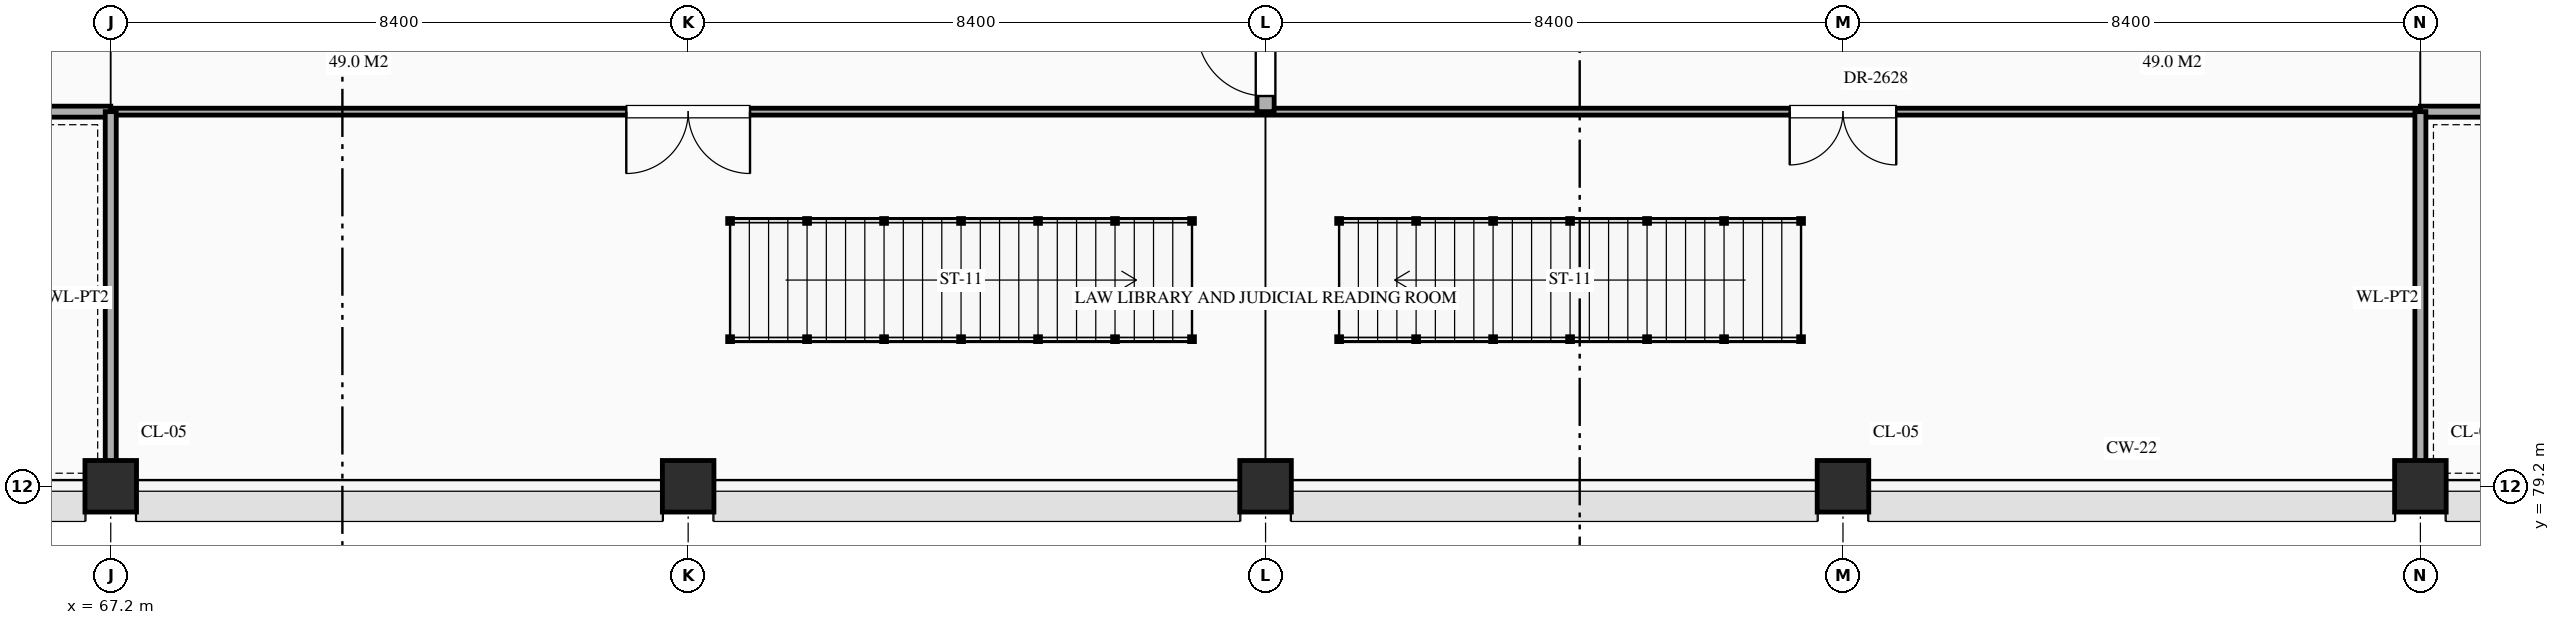
"""IFC4 building model, lengths in metres.
Left out: names, types, materials, properties, quantities, classifications, styles, units other than length and angle.
Written with IfcOpenShell. Run it as: python <this file> out.ifc"""

import sys

from ifc_helpers import new_model, si_unit, direction, frame, frame_2d, origin, origin_2d, place, context, subcontext, project, spatial, rectangle, extrude, element, fill, save


model = new_model("IFC4")
c1 = context("Model", 3, precision=1e-05, world=origin(), true_north=direction((0.0, 1.0)))
c2 = subcontext(c1, "Body", "Model", "MODEL_VIEW")
j1 = project(units=[si_unit("LENGTHUNIT", "METRE"), si_unit("PLANEANGLEUNIT", "RADIAN")], contexts=[c1])
p1 = place(None, origin())
s1 = spatial("IfcSite", under=j1, at=p1, CompositionType="ELEMENT")
p2 = place(p1, origin())
s2 = spatial("IfcBuilding", under=s1, at=p2, CompositionType="ELEMENT")
p3 = place(p2, frame((0.0, 0.0, 35.1)))
s3 = spatial("IfcBuildingStorey", under=s2, at=p3, CompositionType="ELEMENT", Elevation=35.1)
for number, where, z_axis, x_axis in (
    (1, (67.2, 79.2, 0.0), (0.0, 0.0, 1.0), (1.0, 0.0, 0.0)),
    (2, (75.6, 79.2, 0.0), (0.0, 0.0, 1.0), (1.0, 0.0, 0.0)),
    (3, (84.0, 79.2, 0.0), (0.0, 0.0, 1.0), (1.0, 0.0, 0.0)),
    (4, (92.4, 79.2, 0.0), (0.0, 0.0, 1.0), (1.0, 0.0, 0.0)),
    (5, (100.8, 79.2, 0.0), (0.0, 0.0, 1.0), (1.0, 0.0, 0.0)),
):
    element("IfcColumn", number, at=place(p3, frame(where, z_axis=z_axis, x_axis=x_axis)), inside=s3, PredefinedType="COLUMN", context=c2, shape_type="SweptSolid", body=[
        extrude(rectangle(XDim=0.75, YDim=0.75, at=origin_2d()), origin(), (0.0, 0.0, 1.0), 4.2),
    ])
p4 = place(p3, frame((50.4, 84.65, 0.0), z_axis=(0.0, 0.0, 1.0), x_axis=(1.0, 0.0, 0.0)))
e6 = element("IfcWall", 6, at=p4, inside=s3, PredefinedType="STANDARD", context=c2, shape_type="SweptSolid", body=[
    extrude(rectangle(XDim=16.8, YDim=0.16, at=frame_2d((8.4, 0.0))), origin(), (0.0, 0.0, 1.0), 3.95),
])
p5 = place(p4, frame((7.45, 0.0, 0.0)))
e7 = element("IfcOpeningElement", 7, at=p5, cuts=e6, PredefinedType="OPENING", context=c2, shape_type="SweptSolid", body=[
    extrude(rectangle(XDim=1.9, YDim=2.5, at=frame_2d((0.95, 1.25))), frame((0.0, 0.092, 0.0), z_axis=(0.0, -1.0, 0.0), x_axis=(1.0, 0.0, 0.0)), (0.0, 0.0, 1.0), 0.184),
])
p6 = place(p3, frame((67.2, 84.65, 0.0), z_axis=(0.0, 0.0, 1.0), x_axis=(1.0, 0.0, 0.0)))
e8 = element("IfcWall", 8, at=p6, inside=s3, PredefinedType="STANDARD", context=c2, shape_type="SweptSolid", body=[
    extrude(rectangle(XDim=33.6, YDim=0.1, at=frame_2d((16.8, 0.0))), origin(), (0.0, 0.0, 1.0), 3.95),
])
p7 = place(p6, frame((7.5, 0.0, 0.0)))
e9 = element("IfcOpeningElement", 9, at=p7, cuts=e8, PredefinedType="OPENING", context=c2, shape_type="SweptSolid", body=[
    extrude(rectangle(XDim=1.8, YDim=2.5, at=frame_2d((0.9, 1.25))), frame((0.0, 0.062, 0.0), z_axis=(0.0, -1.0, 0.0), x_axis=(1.0, 0.0, 0.0)), (0.0, 0.0, 1.0), 0.124),
])
p8 = place(p6, frame((24.425, 0.0, 0.0)))
e10 = element("IfcOpeningElement", 10, at=p8, cuts=e8, PredefinedType="OPENING", context=c2, shape_type="SweptSolid", body=[
    extrude(rectangle(XDim=1.55, YDim=2.35, at=frame_2d((0.775, 1.175))), frame((0.0, 0.062, 0.0), z_axis=(0.0, -1.0, 0.0), x_axis=(1.0, 0.0, 0.0)), (0.0, 0.0, 1.0), 0.124),
])
p9 = place(p3, frame((100.8, 84.65, 0.0), z_axis=(0.0, 0.0, 1.0), x_axis=(1.0, 0.0, 0.0)))
e11 = element("IfcWall", 11, at=p9, inside=s3, PredefinedType="STANDARD", context=c2, shape_type="SweptSolid", body=[
    extrude(rectangle(XDim=16.8, YDim=0.16, at=frame_2d((8.4, 0.0))), origin(), (0.0, 0.0, 1.0), 3.95),
])
p10 = place(p9, frame((7.55, 0.0, 0.0)))
e12 = element("IfcOpeningElement", 12, at=p10, cuts=e11, PredefinedType="OPENING", context=c2, shape_type="SweptSolid", body=[
    extrude(rectangle(XDim=1.7, YDim=2.45, at=frame_2d((0.85, 1.225))), frame((0.0, 0.092, 0.0), z_axis=(0.0, -1.0, 0.0), x_axis=(1.0, 0.0, 0.0)), (0.0, 0.0, 1.0), 0.184),
])
p11 = place(p3, frame((67.2, 79.24, 0.0), z_axis=(0.0, 0.0, 1.0), x_axis=(0.0, 1.0, 0.0)))
e13 = element("IfcWall", 13, at=p11, inside=s3, PredefinedType="STANDARD", context=c2, shape_type="SweptSolid", body=[
    extrude(rectangle(XDim=5.41, YDim=0.16, at=frame_2d((2.705, 0.0))), origin(), (0.0, 0.0, 1.0), 3.2),
])
p12 = place(p3, frame((84.0, 84.65, 0.0), z_axis=(0.0, 0.0, 1.0), x_axis=(0.0, 1.0, 0.0)))
e14 = element("IfcWall", 14, at=p12, inside=s3, PredefinedType="STANDARD", context=c2, shape_type="SweptSolid", body=[
    extrude(rectangle(XDim=30.51, YDim=0.25, at=frame_2d((15.255, 0.0))), origin(), (0.0, 0.0, 1.0), 3.2),
])
p13 = place(p12, frame((17.097, 0.0, 0.0)))
e15 = element("IfcOpeningElement", 15, at=p13, cuts=e14, PredefinedType="OPENING", context=c2, shape_type="SweptSolid", body=[
    extrude(rectangle(XDim=2.0, YDim=2.4, at=frame_2d((1.0, 1.2))), frame((0.0, 0.137, 0.0), z_axis=(0.0, -1.0, 0.0), x_axis=(1.0, 0.0, 0.0)), (0.0, 0.0, 1.0), 0.274),
])
p14 = place(p12, frame((7.127, 0.0, 0.0)))
e16 = element("IfcOpeningElement", 16, at=p14, cuts=e14, PredefinedType="OPENING", context=c2, shape_type="SweptSolid", body=[
    extrude(rectangle(XDim=0.95, YDim=2.15, at=frame_2d((0.475, 1.075))), frame((0.0, 0.137, 0.0), z_axis=(0.0, -1.0, 0.0), x_axis=(1.0, 0.0, 0.0)), (0.0, 0.0, 1.0), 0.274),
])
p15 = place(p12, frame((9.823, 0.0, 0.0)))
e17 = element("IfcOpeningElement", 17, at=p15, cuts=e14, PredefinedType="OPENING", context=c2, shape_type="SweptSolid", body=[
    extrude(rectangle(XDim=0.95, YDim=2.15, at=frame_2d((0.475, 1.075))), frame((0.0, 0.137, 0.0), z_axis=(0.0, -1.0, 0.0), x_axis=(1.0, 0.0, 0.0)), (0.0, 0.0, 1.0), 0.274),
])
p16 = place(p12, frame((20.603, 0.0, 0.0)))
e18 = element("IfcOpeningElement", 18, at=p16, cuts=e14, PredefinedType="OPENING", context=c2, shape_type="SweptSolid", body=[
    extrude(rectangle(XDim=1.6, YDim=2.3, at=frame_2d((0.8, 1.15))), frame((0.0, 0.137, 0.0), z_axis=(0.0, -1.0, 0.0), x_axis=(1.0, 0.0, 0.0)), (0.0, 0.0, 1.0), 0.274),
])
p17 = place(p12, frame((23.873, 0.0, 0.0)))
e19 = element("IfcOpeningElement", 19, at=p17, cuts=e14, PredefinedType="OPENING", context=c2, shape_type="SweptSolid", body=[
    extrude(rectangle(XDim=1.0, YDim=2.2, at=frame_2d((0.5, 1.1))), frame((0.0, 0.137, 0.0), z_axis=(0.0, -1.0, 0.0), x_axis=(1.0, 0.0, 0.0)), (0.0, 0.0, 1.0), 0.274),
])
p18 = place(p12, frame((0.228, 0.0, 0.0)))
e20 = element("IfcOpeningElement", 20, at=p18, cuts=e14, PredefinedType="OPENING", context=c2, shape_type="SweptSolid", body=[
    extrude(rectangle(XDim=1.0, YDim=2.2, at=frame_2d((0.5, 1.1))), frame((0.0, 0.137, 0.0), z_axis=(0.0, -1.0, 0.0), x_axis=(1.0, 0.0, 0.0)), (0.0, 0.0, 1.0), 0.274),
])
p19 = place(p3, frame((100.8, 79.24, 0.0), z_axis=(0.0, 0.0, 1.0), x_axis=(0.0, 1.0, 0.0)))
e21 = element("IfcWall", 21, at=p19, inside=s3, PredefinedType="STANDARD", context=c2, shape_type="SweptSolid", body=[
    extrude(rectangle(XDim=5.41, YDim=0.16, at=frame_2d((2.705, 0.0))), origin(), (0.0, 0.0, 1.0), 3.2),
])
p20 = place(p18, origin())
e22 = element("IfcDoor", 22, at=p20, inside=s3, OperationType="SINGLE_SWING_RIGHT", PredefinedType="DOOR", context=c2, shape_type="SweptSolid", body=[
    extrude(rectangle(XDim=1.0, YDim=2.2, at=frame_2d((0.5, 1.1))), frame((0.0, 0.025, 0.0), z_axis=(0.0, -1.0, 0.0), x_axis=(1.0, 0.0, 0.0)), (0.0, 0.0, 1.0), 0.05),
])
fill(e20, e22)
p21 = place(p7, frame((1.8, 0.0, 0.0), z_axis=(0.0, 0.0, 1.0), x_axis=(-1.0, 0.0, 0.0)))
e23 = element("IfcDoor", 23, at=p21, inside=s3, OperationType="DOUBLE_DOOR_SINGLE_SWING", PredefinedType="DOOR", context=c2, shape_type="SweptSolid", body=[
    extrude(rectangle(XDim=1.8, YDim=2.5, at=frame_2d((0.9, 1.25))), frame((0.0, 0.025, 0.0), z_axis=(0.0, -1.0, 0.0), x_axis=(1.0, 0.0, 0.0)), (0.0, 0.0, 1.0), 0.05),
])
fill(e9, e23)
p22 = place(p8, frame((1.55, 0.0, 0.0), z_axis=(0.0, 0.0, 1.0), x_axis=(-1.0, 0.0, 0.0)))
e24 = element("IfcDoor", 24, at=p22, inside=s3, OperationType="DOUBLE_DOOR_SINGLE_SWING", PredefinedType="DOOR", context=c2, shape_type="SweptSolid", body=[
    extrude(rectangle(XDim=1.55, YDim=2.35, at=frame_2d((0.775, 1.175))), frame((0.0, 0.025, 0.0), z_axis=(0.0, -1.0, 0.0), x_axis=(1.0, 0.0, 0.0)), (0.0, 0.0, 1.0), 0.05),
])
fill(e10, e24)
save(model, sys.argv[1])
